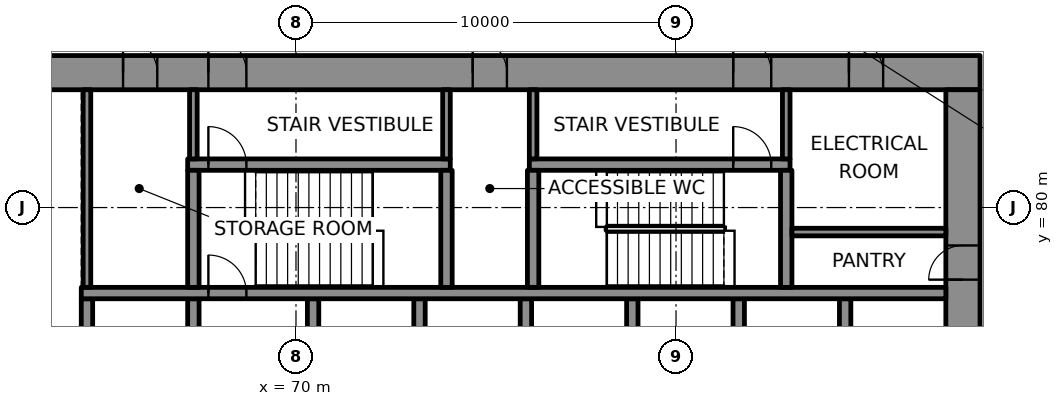
"""IFC4 building model, lengths in metres.
Left out: names, types, materials, properties, quantities, classifications, styles, units other than length and angle.
Written with IfcOpenShell. Run it as: python <this file> out.ifc"""

import sys

from ifc_helpers import new_model, si_unit, direction, frame, frame_2d, origin, place, context, subcontext, project, spatial, rectangle, extrude, element, fill, save


model = new_model("IFC4")
c1 = context("Model", 3, precision=1e-05, world=origin(), true_north=direction((0.0, 1.0)))
c2 = subcontext(c1, "Body", "Model", "MODEL_VIEW")
j1 = project(units=[si_unit("LENGTHUNIT", "METRE"), si_unit("PLANEANGLEUNIT", "RADIAN")], contexts=[c1])
p1 = place(None, origin())
s1 = spatial("IfcSite", under=j1, at=p1, CompositionType="ELEMENT")
p2 = place(p1, origin())
s2 = spatial("IfcBuilding", under=s1, at=p2, CompositionType="ELEMENT")
p3 = place(p2, frame((0.0, 0.0, 77.8)))
s3 = spatial("IfcBuildingStorey", under=s2, at=p3, CompositionType="ELEMENT", Elevation=77.8)
p4 = place(p3, frame((62.0, 83.55, 0.0), z_axis=(0.0, 0.0, 1.0), x_axis=(1.0, 0.0, 0.0)))
e1 = element("IfcWall", 1, at=p4, inside=s3, PredefinedType="SHEAR", context=c2, shape_type="SweptSolid", body=[
    extrude(rectangle(XDim=26.0, YDim=0.9, at=frame_2d((13.0, 0.0))), origin(), (0.0, 0.0, 1.0), 4.0),
])
p5 = place(p4, frame((5.695, 0.0, 0.0)))
e2 = element("IfcOpeningElement", 2, at=p5, cuts=e1, PredefinedType="OPENING", context=c2, shape_type="SweptSolid", body=[
    extrude(rectangle(XDim=1.0, YDim=2.1, at=frame_2d((0.5, 1.05))), frame((0.0, 0.46, 0.0), z_axis=(0.0, -1.0, 0.0), x_axis=(1.0, 0.0, 0.0)), (0.0, 0.0, 1.0), 0.92),
])
p6 = place(p4, frame((19.505, 0.0, 0.0)))
e3 = element("IfcOpeningElement", 3, at=p6, cuts=e1, PredefinedType="OPENING", context=c2, shape_type="SweptSolid", body=[
    extrude(rectangle(XDim=1.0, YDim=2.1, at=frame_2d((0.5, 1.05))), frame((0.0, 0.46, 0.0), z_axis=(0.0, -1.0, 0.0), x_axis=(1.0, 0.0, 0.0)), (0.0, 0.0, 1.0), 0.92),
])
p7 = place(p4, frame((3.45, 0.0, 0.0)))
e4 = element("IfcOpeningElement", 4, at=p7, cuts=e1, PredefinedType="OPENING", context=c2, shape_type="SweptSolid", body=[
    extrude(rectangle(XDim=0.9, YDim=2.1, at=frame_2d((0.45, 1.05))), frame((0.0, 0.46, 0.0), z_axis=(0.0, -1.0, 0.0), x_axis=(1.0, 0.0, 0.0)), (0.0, 0.0, 1.0), 0.92),
])
p8 = place(p4, frame((12.65, 0.0, 0.0)))
e5 = element("IfcOpeningElement", 5, at=p8, cuts=e1, PredefinedType="OPENING", context=c2, shape_type="SweptSolid", body=[
    extrude(rectangle(XDim=0.9, YDim=2.1, at=frame_2d((0.45, 1.05))), frame((0.0, 0.46, 0.0), z_axis=(0.0, -1.0, 0.0), x_axis=(1.0, 0.0, 0.0)), (0.0, 0.0, 1.0), 0.92),
])
p9 = place(p4, frame((22.55, 0.0, 0.0)))
e6 = element("IfcOpeningElement", 6, at=p9, cuts=e1, PredefinedType="OPENING", context=c2, shape_type="SweptSolid", body=[
    extrude(rectangle(XDim=0.9, YDim=2.1, at=frame_2d((0.45, 1.05))), frame((0.0, 0.46, 0.0), z_axis=(0.0, -1.0, 0.0), x_axis=(1.0, 0.0, 0.0)), (0.0, 0.0, 1.0), 0.92),
])
p10 = place(p3, frame((87.55, 66.9, 0.0), z_axis=(0.0, 0.0, 1.0), x_axis=(0.0, 1.0, 0.0)))
e7 = element("IfcWall", 7, at=p10, inside=s3, PredefinedType="SHEAR", context=c2, shape_type="SweptSolid", body=[
    extrude(rectangle(XDim=16.2, YDim=0.9, at=frame_2d((8.1, 0.0))), origin(), (0.0, 0.0, 1.0), 4.0),
])
p11 = place(p10, frame((5.5, 0.0, 0.0)))
e8 = element("IfcOpeningElement", 8, at=p11, cuts=e7, PredefinedType="OPENING", context=c2, shape_type="SweptSolid", body=[
    extrude(rectangle(XDim=1.8, YDim=2.1, at=frame_2d((0.9, 1.05))), frame((0.0, 0.46, 0.0), z_axis=(0.0, -1.0, 0.0), x_axis=(1.0, 0.0, 0.0)), (0.0, 0.0, 1.0), 0.92),
])
p12 = place(p10, frame((11.202, 0.0, 0.0)))
e9 = element("IfcOpeningElement", 9, at=p12, cuts=e7, PredefinedType="OPENING", context=c2, shape_type="SweptSolid", body=[
    extrude(rectangle(XDim=0.9, YDim=2.1, at=frame_2d((0.45, 1.05))), frame((0.0, 0.46, 0.0), z_axis=(0.0, -1.0, 0.0), x_axis=(1.0, 0.0, 0.0)), (0.0, 0.0, 1.0), 0.92),
])
for number, where, z_axis, x_axis in (
    (10, (64.5, 75.0, 0.0), (0.0, 0.0, 1.0), (0.0, 1.0, 0.0)),
    (11, (67.3, 75.0, 0.0), (0.0, 0.0, 1.0), (0.0, 1.0, 0.0)),
):
    element("IfcWall", number, at=place(p3, frame(where, z_axis=z_axis, x_axis=x_axis)), inside=s3, PredefinedType="SHEAR", context=c2, shape_type="SweptSolid", body=[
        extrude(rectangle(XDim=2.6, YDim=0.3, at=frame_2d((1.3, 0.0))), origin(), (0.0, 0.0, 1.0), 4.0),
    ])
p13 = place(p3, frame((70.45, 75.0, 0.0), z_axis=(0.0, 0.0, 1.0), x_axis=(0.0, 1.0, 0.0)))
e12 = element("IfcWall", 12, at=p13, inside=s3, PredefinedType="SHEAR", context=c2, shape_type="SweptSolid", body=[
    extrude(rectangle(XDim=2.6, YDim=0.3, at=frame_2d((1.3, 0.0))), origin(), (0.0, 0.0, 1.0), 4.0),
])
p14 = place(p13, frame((0.15, 0.0, 0.0)))
e13 = element("IfcOpeningElement", 13, at=p14, cuts=e12, PredefinedType="OPENING", context=c2, shape_type="SweptSolid", body=[
    extrude(rectangle(XDim=1.1, YDim=2.1, at=frame_2d((0.55, 1.05))), frame((0.0, 0.16, 0.0), z_axis=(0.0, -1.0, 0.0), x_axis=(1.0, 0.0, 0.0)), (0.0, 0.0, 1.0), 0.32),
])
for number, where, z_axis, x_axis in (
    (14, (73.25, 75.0, 0.0), (0.0, 0.0, 1.0), (0.0, 1.0, 0.0)),
    (15, (76.05, 75.0, 0.0), (0.0, 0.0, 1.0), (0.0, 1.0, 0.0)),
    (16, (78.85, 75.0, 0.0), (0.0, 0.0, 1.0), (0.0, 1.0, 0.0)),
    (17, (81.65, 75.0, 0.0), (0.0, 0.0, 1.0), (0.0, 1.0, 0.0)),
    (18, (84.45, 75.0, 0.0), (0.0, 0.0, 1.0), (0.0, 1.0, 0.0)),
):
    element("IfcWall", number, at=place(p3, frame(where, z_axis=z_axis, x_axis=x_axis)), inside=s3, PredefinedType="SHEAR", context=c2, shape_type="SweptSolid", body=[
        extrude(rectangle(XDim=2.6, YDim=0.3, at=frame_2d((1.3, 0.0))), origin(), (0.0, 0.0, 1.0), 4.0),
    ])
p15 = place(p3, frame((64.35, 77.75, 0.0), z_axis=(0.0, 0.0, 1.0), x_axis=(1.0, 0.0, 0.0)))
e19 = element("IfcWall", 19, at=p15, inside=s3, PredefinedType="SHEAR", context=c2, shape_type="SweptSolid", body=[
    extrude(rectangle(XDim=22.75, YDim=0.3, at=frame_2d((11.375, 0.0))), origin(), (0.0, 0.0, 1.0), 4.0),
])
p16 = place(p15, frame((3.345, 0.0, 0.0)))
e20 = element("IfcOpeningElement", 20, at=p16, cuts=e19, PredefinedType="OPENING", context=c2, shape_type="SweptSolid", body=[
    extrude(rectangle(XDim=1.0, YDim=2.1, at=frame_2d((0.5, 1.05))), frame((0.0, 0.16, 0.0), z_axis=(0.0, -1.0, 0.0), x_axis=(1.0, 0.0, 0.0)), (0.0, 0.0, 1.0), 0.32),
])
p17 = place(p3, frame((67.15, 81.13, 0.0), z_axis=(0.0, 0.0, 1.0), x_axis=(1.0, 0.0, 0.0)))
e21 = element("IfcWall", 21, at=p17, inside=s3, PredefinedType="SHEAR", context=c2, shape_type="SweptSolid", body=[
    extrude(rectangle(XDim=6.91, YDim=0.3, at=frame_2d((3.455, 0.0))), origin(), (0.0, 0.0, 1.0), 4.0),
])
p18 = place(p17, frame((0.545, 0.0, 0.0)))
e22 = element("IfcOpeningElement", 22, at=p18, cuts=e21, PredefinedType="OPENING", context=c2, shape_type="SweptSolid", body=[
    extrude(rectangle(XDim=1.0, YDim=2.1, at=frame_2d((0.5, 1.05))), frame((0.0, 0.16, 0.0), z_axis=(0.0, -1.0, 0.0), x_axis=(1.0, 0.0, 0.0)), (0.0, 0.0, 1.0), 0.32),
])
p19 = place(p3, frame((76.14, 81.13, 0.0), z_axis=(0.0, 0.0, 1.0), x_axis=(1.0, 0.0, 0.0)))
e23 = element("IfcWall", 23, at=p19, inside=s3, PredefinedType="SHEAR", context=c2, shape_type="SweptSolid", body=[
    extrude(rectangle(XDim=6.86, YDim=0.3, at=frame_2d((3.43, 0.0))), origin(), (0.0, 0.0, 1.0), 4.0),
])
p20 = place(p19, frame((5.365, 0.0, 0.0)))
e24 = element("IfcOpeningElement", 24, at=p20, cuts=e23, PredefinedType="OPENING", context=c2, shape_type="SweptSolid", body=[
    extrude(rectangle(XDim=1.0, YDim=2.1, at=frame_2d((0.5, 1.05))), frame((0.0, 0.16, 0.0), z_axis=(0.0, -1.0, 0.0), x_axis=(1.0, 0.0, 0.0)), (0.0, 0.0, 1.0), 0.32),
])
for number, where, z_axis, x_axis in (
    (25, (67.3, 77.9, 0.0), (0.0, 0.0, 1.0), (0.0, 1.0, 0.0)),
    (26, (73.96, 77.9, 0.0), (0.0, 0.0, 1.0), (0.0, 1.0, 0.0)),
    (27, (76.24, 77.9, 0.0), (0.0, 0.0, 1.0), (0.0, 1.0, 0.0)),
    (28, (82.9, 77.9, 0.0), (0.0, 0.0, 1.0), (0.0, 1.0, 0.0)),
):
    element("IfcWall", number, at=place(p3, frame(where, z_axis=z_axis, x_axis=x_axis)), inside=s3, PredefinedType="SHEAR", context=c2, shape_type="SweptSolid", body=[
        extrude(rectangle(XDim=3.08, YDim=0.3, at=frame_2d((1.54, 0.0))), origin(), (0.0, 0.0, 1.0), 4.0),
    ])
p21 = place(p3, frame((83.05, 79.355, 0.0), z_axis=(0.0, 0.0, 1.0), x_axis=(1.0, 0.0, 0.0)))
e29 = element("IfcWall", 29, at=p21, inside=s3, PredefinedType="PARTITIONING", context=c2, shape_type="SweptSolid", body=[
    extrude(rectangle(XDim=4.05, YDim=0.2, at=frame_2d((2.025, 0.0))), origin(), (0.0, 0.0, 1.0), 4.0),
])
p22 = place(p3, frame((64.5, 77.9, 0.0), z_axis=(0.0, 0.0, 1.0), x_axis=(0.0, 1.0, 0.0)))
e30 = element("IfcWall", 30, at=p22, inside=s3, PredefinedType="PARTITIONING", context=c2, shape_type="SweptSolid", body=[
    extrude(rectangle(XDim=5.2, YDim=0.2, at=frame_2d((2.6, 0.0))), origin(), (0.0, 0.0, 1.0), 4.0),
])
for number, where, z_axis, x_axis in (
    (31, (67.3, 81.28, 0.0), (0.0, 0.0, 1.0), (0.0, 1.0, 0.0)),
    (32, (73.96, 81.28, 0.0), (0.0, 0.0, 1.0), (0.0, 1.0, 0.0)),
    (33, (76.24, 81.28, 0.0), (0.0, 0.0, 1.0), (0.0, 1.0, 0.0)),
    (34, (82.9, 81.28, 0.0), (0.0, 0.0, 1.0), (0.0, 1.0, 0.0)),
):
    element("IfcWall", number, at=place(p3, frame(where, z_axis=z_axis, x_axis=x_axis)), inside=s3, PredefinedType="PARTITIONING", context=c2, shape_type="SweptSolid", body=[
        extrude(rectangle(XDim=1.82, YDim=0.2, at=frame_2d((0.91, 0.0))), origin(), (0.0, 0.0, 1.0), 4.0),
    ])
p23 = place(p16, origin())
e35 = element("IfcDoor", 35, at=p23, inside=s3, OperationType="SINGLE_SWING_LEFT", PredefinedType="DOOR", context=c2, shape_type="SweptSolid", body=[
    extrude(rectangle(XDim=1.0, YDim=2.1, at=frame_2d((0.5, 1.05))), frame((0.0, 0.025, 0.0), z_axis=(0.0, -1.0, 0.0), x_axis=(1.0, 0.0, 0.0)), (0.0, 0.0, 1.0), 0.05),
])
fill(e20, e35)
p24 = place(p18, origin())
e36 = element("IfcDoor", 36, at=p24, inside=s3, OperationType="SINGLE_SWING_RIGHT", PredefinedType="DOOR", context=c2, shape_type="SweptSolid", body=[
    extrude(rectangle(XDim=1.0, YDim=2.1, at=frame_2d((0.5, 1.05))), frame((0.0, 0.025, 0.0), z_axis=(0.0, -1.0, 0.0), x_axis=(1.0, 0.0, 0.0)), (0.0, 0.0, 1.0), 0.05),
])
fill(e22, e36)
p25 = place(p5, origin())
e37 = element("IfcDoor", 37, at=p25, inside=s3, OperationType="SINGLE_SWING_LEFT", PredefinedType="DOOR", context=c2, shape_type="SweptSolid", body=[
    extrude(rectangle(XDim=1.0, YDim=2.1, at=frame_2d((0.5, 1.05))), frame((0.0, 0.17, 0.0), z_axis=(0.0, -1.0, 0.0), x_axis=(1.0, 0.0, 0.0)), (0.0, 0.0, 1.0), 0.34),
])
fill(e2, e37)
p26 = place(p20, origin())
e38 = element("IfcDoor", 38, at=p26, inside=s3, OperationType="SINGLE_SWING_RIGHT", PredefinedType="DOOR", context=c2, shape_type="SweptSolid", body=[
    extrude(rectangle(XDim=1.0, YDim=2.1, at=frame_2d((0.5, 1.05))), frame((0.0, 0.025, 0.0), z_axis=(0.0, -1.0, 0.0), x_axis=(1.0, 0.0, 0.0)), (0.0, 0.0, 1.0), 0.05),
])
fill(e24, e38)
p27 = place(p6, origin())
e39 = element("IfcDoor", 39, at=p27, inside=s3, OperationType="SINGLE_SWING_LEFT", PredefinedType="DOOR", context=c2, shape_type="SweptSolid", body=[
    extrude(rectangle(XDim=1.0, YDim=2.1, at=frame_2d((0.5, 1.05))), frame((0.0, 0.17, 0.0), z_axis=(0.0, -1.0, 0.0), x_axis=(1.0, 0.0, 0.0)), (0.0, 0.0, 1.0), 0.34),
])
fill(e3, e39)
p28 = place(p7, origin())
e40 = element("IfcDoor", 40, at=p28, inside=s3, OperationType="SINGLE_SWING_RIGHT", PredefinedType="DOOR", context=c2, shape_type="SweptSolid", body=[
    extrude(rectangle(XDim=0.9, YDim=2.1, at=frame_2d((0.45, 1.05))), frame((0.0, 0.17, 0.0), z_axis=(0.0, -1.0, 0.0), x_axis=(1.0, 0.0, 0.0)), (0.0, 0.0, 1.0), 0.34),
])
fill(e4, e40)
p29 = place(p8, origin())
e41 = element("IfcDoor", 41, at=p29, inside=s3, OperationType="SINGLE_SWING_LEFT", PredefinedType="DOOR", context=c2, shape_type="SweptSolid", body=[
    extrude(rectangle(XDim=0.9, YDim=2.1, at=frame_2d((0.45, 1.05))), frame((0.0, 0.17, 0.0), z_axis=(0.0, -1.0, 0.0), x_axis=(1.0, 0.0, 0.0)), (0.0, 0.0, 1.0), 0.34),
])
fill(e5, e41)
p30 = place(p12, origin())
e42 = element("IfcDoor", 42, at=p30, inside=s3, OperationType="SINGLE_SWING_RIGHT", PredefinedType="DOOR", context=c2, shape_type="SweptSolid", body=[
    extrude(rectangle(XDim=0.9, YDim=2.1, at=frame_2d((0.45, 1.05))), frame((0.0, 0.17, 0.0), z_axis=(0.0, -1.0, 0.0), x_axis=(1.0, 0.0, 0.0)), (0.0, 0.0, 1.0), 0.34),
])
fill(e9, e42)
p31 = place(p9, origin())
e43 = element("IfcDoor", 43, at=p31, inside=s3, OperationType="SINGLE_SWING_LEFT", PredefinedType="DOOR", context=c2, shape_type="SweptSolid", body=[
    extrude(rectangle(XDim=0.9, YDim=2.1, at=frame_2d((0.45, 1.05))), frame((0.0, 0.17, 0.0), z_axis=(0.0, -1.0, 0.0), x_axis=(1.0, 0.0, 0.0)), (0.0, 0.0, 1.0), 0.34),
])
fill(e6, e43)
save(model, sys.argv[1])
